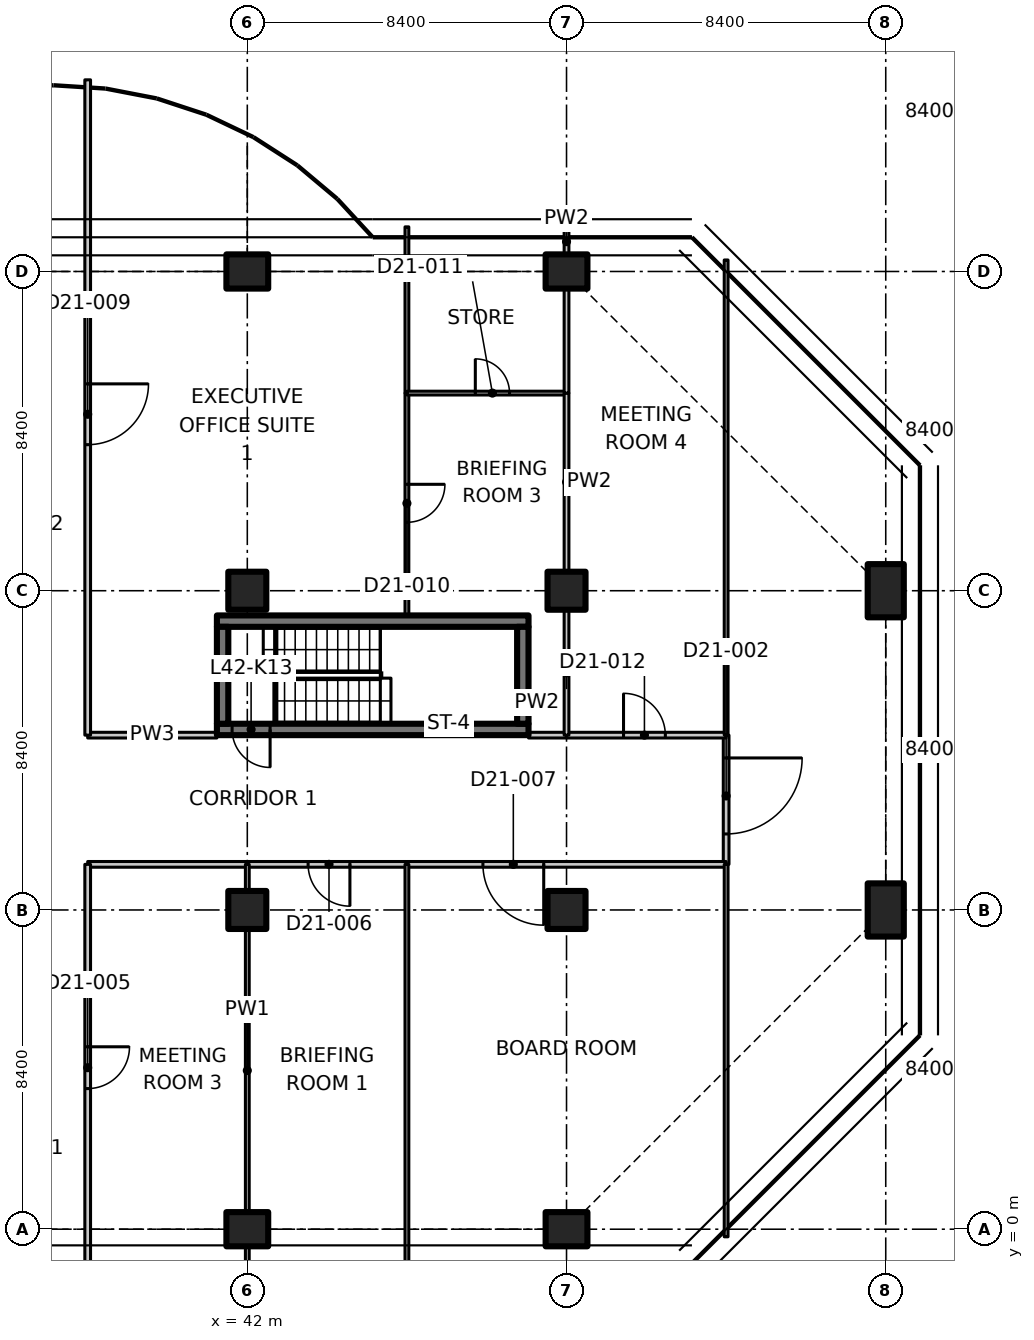
"""IFC4 building model, lengths in metres.
Left out: names, types, materials, properties, quantities, classifications, styles, units other than length and angle.
Written with IfcOpenShell. Run it as: python <this file> out.ifc"""

import sys

from ifc_helpers import new_model, si_unit, direction, frame, frame_2d, origin, origin_2d, place, context, subcontext, project, spatial, polyline, rectangle, outline, extrude, element, fill, save


model = new_model("IFC4")
c1 = context("Model", 3, precision=1e-05, world=origin(), true_north=direction((0.0, 1.0)))
c2 = subcontext(c1, "Body", "Model", "MODEL_VIEW")
j1 = project(units=[si_unit("LENGTHUNIT", "METRE"), si_unit("PLANEANGLEUNIT", "RADIAN")], contexts=[c1])
p1 = place(None, origin())
s1 = spatial("IfcSite", under=j1, at=p1, CompositionType="ELEMENT")
p2 = place(p1, origin())
s2 = spatial("IfcBuilding", under=s1, at=p2, CompositionType="ELEMENT")
p3 = place(p2, frame((0.0, 0.0, 170.4)))
s3 = spatial("IfcBuildingStorey", under=s2, at=p3, CompositionType="ELEMENT", Elevation=170.4)
p4 = place(p3, frame((42.0, 0.0, 0.0), z_axis=(0.0, 0.0, 1.0), x_axis=(0.0, 1.0, 0.0)))
e1 = element("IfcColumn", 1, at=p4, inside=s3, PredefinedType="COLUMN", context=c2, shape_type="SweptSolid", body=[
    extrude(rectangle(XDim=0.9, YDim=1.1, at=origin_2d()), origin(), (0.0, 0.0, 1.0), 3.35),
])
for number, where, z_axis, x_axis in (
    (2, (42.0, 8.4, 0.0), (0.0, 0.0, 1.0), (1.0, 0.0, 0.0)),
    (3, (42.0, 16.8, 0.0), (0.0, 0.0, 1.0), (1.0, 0.0, 0.0)),
):
    element("IfcColumn", number, at=place(p3, frame(where, z_axis=z_axis, x_axis=x_axis)), inside=s3, PredefinedType="COLUMN", context=c2, shape_type="SweptSolid", body=[
        extrude(rectangle(XDim=1.0, YDim=1.0, at=origin_2d()), origin(), (0.0, 0.0, 1.0), 3.35),
    ])
for number, where, z_axis, x_axis in (
    (4, (42.0, 25.2, 0.0), (0.0, 0.0, 1.0), (0.0, 1.0, 0.0)),
    (5, (50.4, 0.0, 0.0), (0.0, 0.0, 1.0), (0.0, 1.0, 0.0)),
):
    element("IfcColumn", number, at=place(p3, frame(where, z_axis=z_axis, x_axis=x_axis)), inside=s3, PredefinedType="COLUMN", context=c2, shape_type="SweptSolid", body=[
        extrude(rectangle(XDim=0.9, YDim=1.1, at=origin_2d()), origin(), (0.0, 0.0, 1.0), 3.35),
    ])
for number, where, z_axis, x_axis in (
    (6, (50.4, 8.4, 0.0), (0.0, 0.0, 1.0), (1.0, 0.0, 0.0)),
    (7, (50.4, 16.8, 0.0), (0.0, 0.0, 1.0), (1.0, 0.0, 0.0)),
):
    element("IfcColumn", number, at=place(p3, frame(where, z_axis=z_axis, x_axis=x_axis)), inside=s3, PredefinedType="COLUMN", context=c2, shape_type="SweptSolid", body=[
        extrude(rectangle(XDim=1.0, YDim=1.0, at=origin_2d()), origin(), (0.0, 0.0, 1.0), 3.35),
    ])
p5 = place(p3, frame((50.4, 25.2, 0.0), z_axis=(0.0, 0.0, 1.0), x_axis=(0.0, 1.0, 0.0)))
e8 = element("IfcColumn", 8, at=p5, inside=s3, PredefinedType="COLUMN", context=c2, shape_type="SweptSolid", body=[
    extrude(rectangle(XDim=0.9, YDim=1.1, at=origin_2d()), origin(), (0.0, 0.0, 1.0), 3.35),
])
for number, where, z_axis, x_axis in (
    (9, (58.8, 8.4, 0.0), (0.0, 0.0, 1.0), (1.0, 0.0, 0.0)),
    (10, (58.8, 16.8, 0.0), (0.0, 0.0, 1.0), (1.0, 0.0, 0.0)),
):
    element("IfcColumn", number, at=place(p3, frame(where, z_axis=z_axis, x_axis=x_axis)), inside=s3, PredefinedType="COLUMN", context=c2, shape_type="SweptSolid", body=[
        extrude(rectangle(XDim=0.95, YDim=1.4, at=origin_2d()), origin(), (0.0, 0.0, 1.0), 3.35),
    ])
p6 = place(p3, frame((49.4, 13.15, 0.0), z_axis=(0.0, 0.0, 1.0), x_axis=(-1.0, 0.0, 0.0)))
e11 = element("IfcWall", 11, at=p6, inside=s3, PredefinedType="SHEAR", context=c2, shape_type="SweptSolid", body=[
    extrude(rectangle(XDim=8.2, YDim=0.3, at=frame_2d((4.1, 0.0))), origin(), (0.0, 0.0, 1.0), 3.35),
])
p7 = place(p6, frame((6.8, 0.0, 0.0)))
e12 = element("IfcOpeningElement", 12, at=p7, cuts=e11, PredefinedType="OPENING", context=c2, shape_type="SweptSolid", body=[
    extrude(rectangle(XDim=1.0, YDim=2.1, at=frame_2d((0.5, 1.05))), frame((0.0, 0.16, 0.0), z_axis=(0.0, -1.0, 0.0), x_axis=(1.0, 0.0, 0.0)), (0.0, 0.0, 1.0), 0.32),
])
p8 = place(p3, frame((41.2, 16.0, 0.0), z_axis=(0.0, 0.0, 1.0), x_axis=(1.0, 0.0, 0.0)))
e13 = element("IfcWall", 13, at=p8, inside=s3, PredefinedType="SHEAR", context=c2, shape_type="SweptSolid", body=[
    extrude(rectangle(XDim=8.2, YDim=0.3, at=frame_2d((4.1, 0.0))), origin(), (0.0, 0.0, 1.0), 3.35),
])
for number, where, z_axis, x_axis in (
    (14, (41.35, 13.3, 0.0), (0.0, 0.0, 1.0), (0.0, 1.0, 0.0)),
    (15, (49.25, 13.3, 0.0), (0.0, 0.0, 1.0), (0.0, 1.0, 0.0)),
):
    element("IfcWall", number, at=place(p3, frame(where, z_axis=z_axis, x_axis=x_axis)), inside=s3, PredefinedType="SHEAR", context=c2, shape_type="SweptSolid", body=[
        extrude(rectangle(XDim=2.55, YDim=0.3, at=frame_2d((1.275, 0.0))), origin(), (0.0, 0.0, 1.0), 3.35),
    ])
p9 = place(p3, frame((54.6, 13.0, 0.0), z_axis=(0.0, 0.0, 1.0), x_axis=(0.0, -1.0, 0.0)))
e16 = element("IfcWall", 16, at=p9, inside=s3, PredefinedType="PARTITIONING", context=c2, shape_type="SweptSolid", body=[
    extrude(rectangle(XDim=3.4, YDim=0.15, at=frame_2d((1.7, 0.0))), origin(), (0.0, 0.0, 1.0), 3.33),
])
p10 = place(p9, frame((0.6, 0.0, 0.0)))
e17 = element("IfcOpeningElement", 17, at=p10, cuts=e16, PredefinedType="OPENING", context=c2, shape_type="SweptSolid", body=[
    extrude(rectangle(XDim=2.0, YDim=2.4, at=frame_2d((1.0, 1.2))), frame((0.0, 0.085, 0.0), z_axis=(0.0, -1.0, 0.0), x_axis=(1.0, 0.0, 0.0)), (0.0, 0.0, 1.0), 0.17),
])
p11 = place(p3, frame((42.0, 9.6, 0.0), z_axis=(0.0, 0.0, 1.0), x_axis=(-1.0, 0.0, 0.0)))
e18 = element("IfcWall", 18, at=p11, inside=s3, PredefinedType="PARTITIONING", context=c2, shape_type="SweptSolid", body=[
    extrude(rectangle(XDim=4.2, YDim=0.15, at=frame_2d((2.1, 0.0))), origin(), (0.0, 0.0, 1.0), 3.33),
])
p12 = place(p3, frame((46.2, 9.6, 0.0), z_axis=(0.0, 0.0, 1.0), x_axis=(-1.0, 0.0, 0.0)))
e19 = element("IfcWall", 19, at=p12, inside=s3, PredefinedType="PARTITIONING", context=c2, shape_type="SweptSolid", body=[
    extrude(rectangle(XDim=4.2, YDim=0.15, at=frame_2d((2.1, 0.0))), origin(), (0.0, 0.0, 1.0), 3.33),
])
p13 = place(p12, frame((1.5, 0.0, 0.0)))
e20 = element("IfcOpeningElement", 20, at=p13, cuts=e19, PredefinedType="OPENING", context=c2, shape_type="SweptSolid", body=[
    extrude(rectangle(XDim=1.1, YDim=2.1, at=frame_2d((0.55, 1.05))), frame((0.0, 0.085, 0.0), z_axis=(0.0, -1.0, 0.0), x_axis=(1.0, 0.0, 0.0)), (0.0, 0.0, 1.0), 0.17),
])
p14 = place(p3, frame((54.6, 9.6, 0.0), z_axis=(0.0, 0.0, 1.0), x_axis=(-1.0, 0.0, 0.0)))
e21 = element("IfcWall", 21, at=p14, inside=s3, PredefinedType="PARTITIONING", context=c2, shape_type="SweptSolid", body=[
    extrude(rectangle(XDim=8.4, YDim=0.15, at=frame_2d((4.2, 0.0))), origin(), (0.0, 0.0, 1.0), 3.33),
])
p15 = place(p14, frame((4.8, 0.0, 0.0)))
e22 = element("IfcOpeningElement", 22, at=p15, cuts=e21, PredefinedType="OPENING", context=c2, shape_type="SweptSolid", body=[
    extrude(rectangle(XDim=1.6, YDim=2.1, at=frame_2d((0.8, 1.05))), frame((0.0, 0.085, 0.0), z_axis=(0.0, -1.0, 0.0), x_axis=(1.0, 0.0, 0.0)), (0.0, 0.0, 1.0), 0.17),
])
p16 = place(p3, frame((37.8, 13.0, 0.0), z_axis=(0.0, 0.0, 1.0), x_axis=(1.0, 0.0, 0.0)))
e23 = element("IfcWall", 23, at=p16, inside=s3, PredefinedType="PARTITIONING", context=c2, shape_type="SweptSolid", body=[
    extrude(rectangle(XDim=3.4, YDim=0.15, at=frame_2d((1.7, 0.0))), origin(), (0.0, 0.0, 1.0), 3.33),
])
p17 = place(p3, frame((49.4, 13.0, 0.0), z_axis=(0.0, 0.0, 1.0), x_axis=(1.0, 0.0, 0.0)))
e24 = element("IfcWall", 24, at=p17, inside=s3, PredefinedType="PARTITIONING", context=c2, shape_type="SweptSolid", body=[
    extrude(rectangle(XDim=1.0, YDim=0.15, at=frame_2d((0.5, 0.0))), origin(), (0.0, 0.0, 1.0), 3.33),
])
p18 = place(p3, frame((50.4, 13.0, 0.0), z_axis=(0.0, 0.0, 1.0), x_axis=(1.0, 0.0, 0.0)))
e25 = element("IfcWall", 25, at=p18, inside=s3, PredefinedType="PARTITIONING", context=c2, shape_type="SweptSolid", body=[
    extrude(rectangle(XDim=4.2, YDim=0.15, at=frame_2d((2.1, 0.0))), origin(), (0.0, 0.0, 1.0), 3.33),
])
p19 = place(p18, frame((1.5, 0.0, 0.0)))
e26 = element("IfcOpeningElement", 26, at=p19, cuts=e25, PredefinedType="OPENING", context=c2, shape_type="SweptSolid", body=[
    extrude(rectangle(XDim=1.1, YDim=2.1, at=frame_2d((0.55, 1.05))), frame((0.0, 0.085, 0.0), z_axis=(0.0, -1.0, 0.0), x_axis=(1.0, 0.0, 0.0)), (0.0, 0.0, 1.0), 0.17),
])
p20 = place(p3, frame((54.6, -0.2, 0.0), z_axis=(0.0, 0.0, 1.0), x_axis=(0.0, 1.0, 0.0)))
e27 = element("IfcWall", 27, at=p20, inside=s3, PredefinedType="PARTITIONING", context=c2, shape_type="SweptSolid", body=[
    extrude(outline(polyline([(0.0, 0.0), (9.8, 0.0), (9.8, 3.33), (5.066, 3.33), (5.064, 2.98), (3.736, 2.98), (3.734, 3.33), (0.0, 3.33), (0.0, 0.0)])), frame((0.0, 0.05, 0.0), z_axis=(0.0, -1.0, 0.0), x_axis=(1.0, 0.0, 0.0)), (0.0, 0.0, 1.0), 0.1),
])
p21 = place(p3, frame((54.6, 13.0, 0.0), z_axis=(0.0, 0.0, 1.0), x_axis=(0.0, 1.0, 0.0)))
e28 = element("IfcWall", 28, at=p21, inside=s3, PredefinedType="PARTITIONING", context=c2, shape_type="SweptSolid", body=[
    extrude(outline(polyline([(0.0, 0.0), (12.502, 0.0), (12.502, 3.33), (12.4, 3.33), (8.666, 3.33), (8.664, 2.98), (7.336, 2.98), (7.334, 3.33), (0.0, 3.33), (0.0, 0.0)])), frame((0.0, 0.05, 0.0), z_axis=(0.0, -1.0, 0.0), x_axis=(1.0, 0.0, 0.0)), (0.0, 0.0, 1.0), 0.1),
])
p22 = place(p3, frame((37.8, 9.6, 0.0), z_axis=(0.0, 0.0, 1.0), x_axis=(0.0, -1.0, 0.0)))
e29 = element("IfcWall", 29, at=p22, inside=s3, PredefinedType="PARTITIONING", context=c2, shape_type="SweptSolid", body=[
    extrude(outline(polyline([(0.0, 0.0), (10.965, 0.0), (10.965, 3.33), (10.7, 3.33), (10.05, 3.33), (10.048, 2.98), (9.152, 2.98), (9.15, 3.33), (0.0, 3.33), (0.0, 0.0)])), frame((0.0, 0.075, 0.0), z_axis=(0.0, -1.0, 0.0), x_axis=(1.0, 0.0, 0.0)), (0.0, 0.0, 1.0), 0.15),
])
p23 = place(p22, frame((4.8, 0.0, 0.0)))
e30 = element("IfcOpeningElement", 30, at=p23, cuts=e29, PredefinedType="OPENING", context=c2, shape_type="SweptSolid", body=[
    extrude(rectangle(XDim=1.1, YDim=2.1, at=frame_2d((0.55, 1.05))), frame((0.0, 0.085, 0.0), z_axis=(0.0, -1.0, 0.0), x_axis=(1.0, 0.0, 0.0)), (0.0, 0.0, 1.0), 0.17),
])
p24 = place(p3, frame((42.0, 9.6, 0.0), z_axis=(0.0, 0.0, 1.0), x_axis=(0.0, -1.0, 0.0)))
e31 = element("IfcWall", 31, at=p24, inside=s3, PredefinedType="PARTITIONING", context=c2, shape_type="SweptSolid", body=[
    extrude(rectangle(XDim=0.68, YDim=0.1, at=frame_2d((0.34, 0.0))), origin(), (0.0, 0.0, 1.0), 3.33),
])
p25 = place(p3, frame((42.0, 7.88, 0.0), z_axis=(0.0, 0.0, 1.0), x_axis=(0.0, -1.0, 0.0)))
e32 = element("IfcWall", 32, at=p25, inside=s3, PredefinedType="PARTITIONING", context=c2, shape_type="SweptSolid", body=[
    extrude(rectangle(XDim=7.41, YDim=0.1, at=frame_2d((3.705, 0.0))), origin(), (0.0, 0.0, 1.0), 3.33),
])
p26 = place(p3, frame((42.0, -0.47, 0.0), z_axis=(0.0, 0.0, 1.0), x_axis=(0.0, -1.0, 0.0)))
e33 = element("IfcWall", 33, at=p26, inside=s3, PredefinedType="PARTITIONING", context=c2, shape_type="SweptSolid", body=[
    extrude(rectangle(XDim=0.63, YDim=0.1, at=frame_2d((0.315, 0.0))), origin(), (0.0, 0.0, 1.0), 3.33),
])
p27 = place(p3, frame((46.2, 9.6, 0.0), z_axis=(0.0, 0.0, 1.0), x_axis=(0.0, -1.0, 0.0)))
e34 = element("IfcWall", 34, at=p27, inside=s3, PredefinedType="PARTITIONING", context=c2, shape_type="SweptSolid", body=[
    extrude(outline(polyline([(0.0, 0.0), (10.965, 0.0), (10.965, 3.33), (10.7, 3.33), (10.05, 3.33), (10.048, 2.98), (9.152, 2.98), (9.15, 3.33), (0.0, 3.33), (0.0, 0.0)])), frame((0.0, 0.05, 0.0), z_axis=(0.0, -1.0, 0.0), x_axis=(1.0, 0.0, 0.0)), (0.0, 0.0, 1.0), 0.1),
])
p28 = place(p3, frame((37.8, 30.243, 0.0), z_axis=(0.0, 0.0, 1.0), x_axis=(0.0, -1.0, 0.0)))
e35 = element("IfcWall", 35, at=p28, inside=s3, PredefinedType="PARTITIONING", context=c2, shape_type="SweptSolid", body=[
    extrude(outline(polyline([(0.0, 0.0), (17.243, 0.0), (17.243, 3.33), (5.493, 3.33), (5.491, 2.98), (4.595, 2.98), (4.593, 3.33), (0.0, 3.33), (0.0, 0.0)])), frame((0.0, 0.075, 0.0), z_axis=(0.0, -1.0, 0.0), x_axis=(1.0, 0.0, 0.0)), (0.0, 0.0, 1.0), 0.15),
])
p29 = place(p28, frame((8.0, 0.0, 0.0)))
e36 = element("IfcOpeningElement", 36, at=p29, cuts=e35, PredefinedType="OPENING", context=c2, shape_type="SweptSolid", body=[
    extrude(rectangle(XDim=1.6, YDim=2.1, at=frame_2d((0.8, 1.05))), frame((0.0, 0.085, 0.0), z_axis=(0.0, -1.0, 0.0), x_axis=(1.0, 0.0, 0.0)), (0.0, 0.0, 1.0), 0.17),
])
p30 = place(p3, frame((46.2, 22.0, 0.0), z_axis=(0.0, 0.0, 1.0), x_axis=(0.0, -1.0, 0.0)))
e37 = element("IfcWall", 37, at=p30, inside=s3, PredefinedType="PARTITIONING", context=c2, shape_type="SweptSolid", body=[
    extrude(rectangle(XDim=5.85, YDim=0.1, at=frame_2d((2.925, 0.0))), origin(), (0.0, 0.0, 1.0), 3.33),
])
p31 = place(p30, frame((2.4, 0.0, 0.0)))
e38 = element("IfcOpeningElement", 38, at=p31, cuts=e37, PredefinedType="OPENING", context=c2, shape_type="SweptSolid", body=[
    extrude(rectangle(XDim=1.0, YDim=2.1, at=frame_2d((0.5, 1.05))), frame((0.0, 0.06, 0.0), z_axis=(0.0, -1.0, 0.0), x_axis=(1.0, 0.0, 0.0)), (0.0, 0.0, 1.0), 0.12),
])
p32 = place(p3, frame((46.2, 26.374, 0.0), z_axis=(0.0, 0.0, 1.0), x_axis=(0.0, -1.0, 0.0)))
e39 = element("IfcWall", 39, at=p32, inside=s3, PredefinedType="PARTITIONING", context=c2, shape_type="SweptSolid", body=[
    extrude(rectangle(XDim=4.374, YDim=0.1, at=frame_2d((2.187, 0.0))), origin(), (0.0, 0.0, 1.0), 2.98),
])
p33 = place(p3, frame((46.2, 22.0, 0.0), z_axis=(0.0, 0.0, 1.0), x_axis=(1.0, 0.0, 0.0)))
e40 = element("IfcWall", 40, at=p33, inside=s3, PredefinedType="PARTITIONING", context=c2, shape_type="SweptSolid", body=[
    extrude(rectangle(XDim=4.2, YDim=0.1, at=frame_2d((2.1, 0.0))), origin(), (0.0, 0.0, 1.0), 3.33),
])
p34 = place(p33, frame((1.8, 0.0, 0.0)))
e41 = element("IfcOpeningElement", 41, at=p34, cuts=e40, PredefinedType="OPENING", context=c2, shape_type="SweptSolid", body=[
    extrude(rectangle(XDim=0.9, YDim=2.1, at=frame_2d((0.45, 1.05))), frame((0.0, 0.06, 0.0), z_axis=(0.0, -1.0, 0.0), x_axis=(1.0, 0.0, 0.0)), (0.0, 0.0, 1.0), 0.12),
])
p35 = place(p3, frame((50.4, 22.0, 0.0), z_axis=(0.0, 0.0, 1.0), x_axis=(0.0, -1.0, 0.0)))
e42 = element("IfcWall", 42, at=p35, inside=s3, PredefinedType="PARTITIONING", context=c2, shape_type="SweptSolid", body=[
    extrude(rectangle(XDim=4.68, YDim=0.125, at=frame_2d((2.34, 0.0))), origin(), (0.0, 0.0, 1.0), 3.33),
])
p36 = place(p3, frame((50.4, 16.28, 0.0), z_axis=(0.0, 0.0, 1.0), x_axis=(0.0, -1.0, 0.0)))
e43 = element("IfcWall", 43, at=p36, inside=s3, PredefinedType="PARTITIONING", context=c2, shape_type="SweptSolid", body=[
    extrude(rectangle(XDim=3.28, YDim=0.125, at=frame_2d((1.64, 0.0))), origin(), (0.0, 0.0, 1.0), 3.33),
])
p37 = place(p3, frame((50.4, 26.3, 0.0), z_axis=(0.0, 0.0, 1.0), x_axis=(0.0, -1.0, 0.0)))
e44 = element("IfcWall", 44, at=p37, inside=s3, PredefinedType="PARTITIONING", context=c2, shape_type="SweptSolid", body=[
    extrude(rectangle(XDim=0.63, YDim=0.125, at=frame_2d((0.315, 0.0))), origin(), (0.0, 0.0, 1.0), 3.33),
])
p38 = place(p3, frame((50.4, 24.73, 0.0), z_axis=(0.0, 0.0, 1.0), x_axis=(0.0, -1.0, 0.0)))
e45 = element("IfcWall", 45, at=p38, inside=s3, PredefinedType="PARTITIONING", context=c2, shape_type="SweptSolid", body=[
    extrude(rectangle(XDim=2.73, YDim=0.125, at=frame_2d((1.365, 0.0))), origin(), (0.0, 0.0, 1.0), 2.98),
])
p39 = place(p7, origin())
e46 = element("IfcDoor", 46, at=p39, inside=s3, OperationType="SINGLE_SWING_RIGHT", PredefinedType="DOOR", context=c2, shape_type="SweptSolid", body=[
    extrude(rectangle(XDim=1.0, YDim=2.1, at=frame_2d((0.5, 1.05))), frame((0.0, 0.025, 0.0), z_axis=(0.0, -1.0, 0.0), x_axis=(1.0, 0.0, 0.0)), (0.0, 0.0, 1.0), 0.05),
])
fill(e12, e46)
p40 = place(p10, origin())
e47 = element("IfcDoor", 47, at=p40, inside=s3, OperationType="DOUBLE_DOOR_SINGLE_SWING", PredefinedType="DOOR", context=c2, shape_type="SweptSolid", body=[
    extrude(rectangle(XDim=2.0, YDim=2.4, at=frame_2d((1.0, 1.2))), frame((0.0, 0.025, 0.0), z_axis=(0.0, -1.0, 0.0), x_axis=(1.0, 0.0, 0.0)), (0.0, 0.0, 1.0), 0.05),
])
fill(e17, e47)
p41 = place(p23, origin())
e48 = element("IfcDoor", 48, at=p41, inside=s3, OperationType="SINGLE_SWING_LEFT", PredefinedType="DOOR", context=c2, shape_type="SweptSolid", body=[
    extrude(rectangle(XDim=1.1, YDim=2.1, at=frame_2d((0.55, 1.05))), frame((0.0, 0.025, 0.0), z_axis=(0.0, -1.0, 0.0), x_axis=(1.0, 0.0, 0.0)), (0.0, 0.0, 1.0), 0.05),
])
fill(e30, e48)
p42 = place(p13, origin())
e49 = element("IfcDoor", 49, at=p42, inside=s3, OperationType="SINGLE_SWING_LEFT", PredefinedType="DOOR", context=c2, shape_type="SweptSolid", body=[
    extrude(rectangle(XDim=1.1, YDim=2.1, at=frame_2d((0.55, 1.05))), frame((0.0, 0.025, 0.0), z_axis=(0.0, -1.0, 0.0), x_axis=(1.0, 0.0, 0.0)), (0.0, 0.0, 1.0), 0.05),
])
fill(e20, e49)
p43 = place(p15, origin())
e50 = element("IfcDoor", 50, at=p43, inside=s3, OperationType="DOUBLE_DOOR_SINGLE_SWING", PredefinedType="DOOR", context=c2, shape_type="SweptSolid", body=[
    extrude(rectangle(XDim=1.6, YDim=2.1, at=frame_2d((0.8, 1.05))), frame((0.0, 0.025, 0.0), z_axis=(0.0, -1.0, 0.0), x_axis=(1.0, 0.0, 0.0)), (0.0, 0.0, 1.0), 0.05),
])
fill(e22, e50)
p44 = place(p29, origin())
e51 = element("IfcDoor", 51, at=p44, inside=s3, OperationType="DOUBLE_DOOR_SINGLE_SWING", PredefinedType="DOOR", context=c2, shape_type="SweptSolid", body=[
    extrude(rectangle(XDim=1.6, YDim=2.1, at=frame_2d((0.8, 1.05))), frame((0.0, 0.025, 0.0), z_axis=(0.0, -1.0, 0.0), x_axis=(1.0, 0.0, 0.0)), (0.0, 0.0, 1.0), 0.05),
])
fill(e36, e51)
p45 = place(p31, origin())
e52 = element("IfcDoor", 52, at=p45, inside=s3, OperationType="SINGLE_SWING_LEFT", PredefinedType="DOOR", context=c2, shape_type="SweptSolid", body=[
    extrude(rectangle(XDim=1.0, YDim=2.1, at=frame_2d((0.5, 1.05))), frame((0.0, 0.025, 0.0), z_axis=(0.0, -1.0, 0.0), x_axis=(1.0, 0.0, 0.0)), (0.0, 0.0, 1.0), 0.05),
])
fill(e38, e52)
p46 = place(p34, origin())
e53 = element("IfcDoor", 53, at=p46, inside=s3, OperationType="SINGLE_SWING_LEFT", PredefinedType="DOOR", context=c2, shape_type="SweptSolid", body=[
    extrude(rectangle(XDim=0.9, YDim=2.1, at=frame_2d((0.45, 1.05))), frame((0.0, 0.025, 0.0), z_axis=(0.0, -1.0, 0.0), x_axis=(1.0, 0.0, 0.0)), (0.0, 0.0, 1.0), 0.05),
])
fill(e41, e53)
p47 = place(p19, origin())
e54 = element("IfcDoor", 54, at=p47, inside=s3, OperationType="SINGLE_SWING_LEFT", PredefinedType="DOOR", context=c2, shape_type="SweptSolid", body=[
    extrude(rectangle(XDim=1.1, YDim=2.1, at=frame_2d((0.55, 1.05))), frame((0.0, 0.025, 0.0), z_axis=(0.0, -1.0, 0.0), x_axis=(1.0, 0.0, 0.0)), (0.0, 0.0, 1.0), 0.05),
])
fill(e26, e54)
save(model, sys.argv[1])
